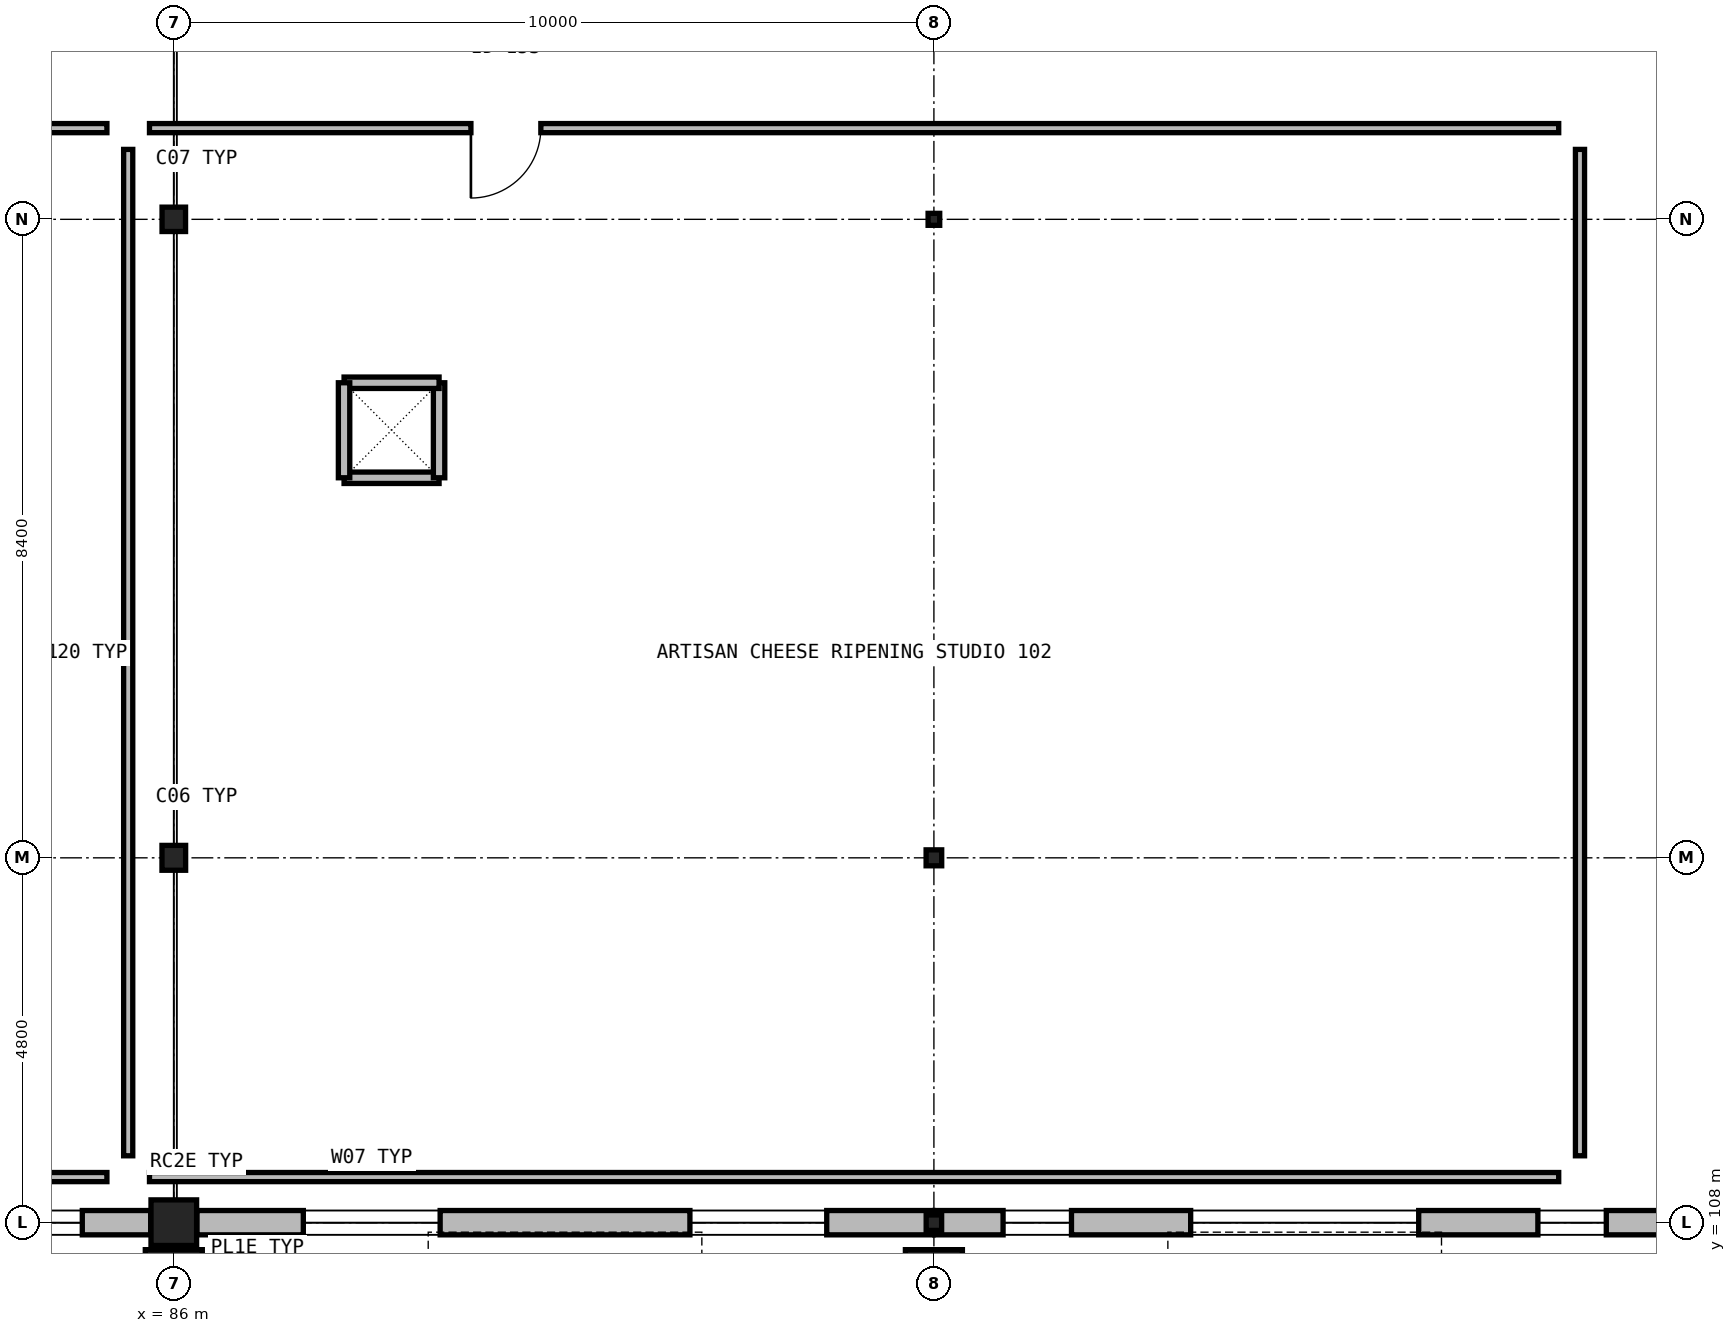
"""IFC4 building model, lengths in metres.
Left out: names, types, materials, properties, quantities, classifications, styles, units other than length and angle.
Written with IfcOpenShell. Run it as: python <this file> out.ifc"""

import sys

from ifc_helpers import new_model, si_unit, direction, frame, frame_2d, origin, origin_2d_with_axis, place, context, subcontext, project, spatial, rectangle, i_section, extrude, element, fill, save


model = new_model("IFC4")
c1 = context("Model", 3, precision=1e-05, world=origin(), true_north=direction((0.0, 1.0)))
c2 = subcontext(c1, "Body", "Model", "MODEL_VIEW")
j1 = project(units=[si_unit("LENGTHUNIT", "METRE"), si_unit("PLANEANGLEUNIT", "RADIAN")], contexts=[c1])
p1 = place(None, origin())
s1 = spatial("IfcSite", under=j1, at=p1, CompositionType="ELEMENT")
p2 = place(p1, origin())
s2 = spatial("IfcBuilding", under=s1, at=p2, CompositionType="ELEMENT")
p3 = place(p2, frame((0.0, 0.0, 4.5)))
s3 = spatial("IfcBuildingStorey", under=s2, at=p3, CompositionType="ELEMENT", Elevation=4.5)
for number, where, z_axis, x_axis in (
    (1, (86.0, 107.42, 0.0), (0.0, 0.0, 1.0), (1.0, 0.0, 0.0)),
    (2, (96.0, 107.42, 0.0), (0.0, 0.0, 1.0), (1.0, 0.0, 0.0)),
):
    element("IfcColumn", number, at=place(p3, frame(where, z_axis=z_axis, x_axis=x_axis)), inside=s3, PredefinedType="PILASTER", context=c2, shape_type="SweptSolid", body=[
        extrude(rectangle(XDim=0.75, YDim=0.45, at=origin_2d_with_axis()), origin(), (0.0, 0.0, 1.0), 3.9),
    ])
p4 = place(p3, frame((86.0, 108.0, 0.0), z_axis=(0.0, 0.0, 1.0), x_axis=(1.0, 0.0, 0.0)))
e3 = element("IfcColumn", 3, at=p4, inside=s3, PredefinedType="COLUMN", context=c2, shape_type="SweptSolid", body=[
    extrude(rectangle(XDim=0.6, YDim=0.6, at=origin_2d_with_axis()), origin(), (0.0, 0.0, 1.0), 3.9),
])
p5 = place(p3, frame((86.0, 112.8, 0.0), z_axis=(0.0, 0.0, 1.0), x_axis=(1.0, 0.0, 0.0)))
e4 = element("IfcColumn", 4, at=p5, inside=s3, PredefinedType="COLUMN", context=c2, shape_type="SweptSolid", body=[
    extrude(i_section(OverallWidth=0.311, OverallDepth=0.327, WebThickness=0.016, FlangeThickness=0.025, FilletRadius=0.017, at=origin_2d_with_axis()), origin(), (0.0, 0.0, 1.0), 3.9),
])
p6 = place(p3, frame((86.0, 121.2, 0.0), z_axis=(0.0, 0.0, 1.0), x_axis=(1.0, 0.0, 0.0)))
e5 = element("IfcColumn", 5, at=p6, inside=s3, PredefinedType="COLUMN", context=c2, shape_type="SweptSolid", body=[
    extrude(i_section(OverallWidth=0.309, OverallDepth=0.321, WebThickness=0.014, FlangeThickness=0.022, FilletRadius=0.017, at=origin_2d_with_axis()), origin(), (0.0, 0.0, 1.0), 3.9),
])
p7 = place(p3, frame((96.0, 108.0, 0.0), z_axis=(0.0, 0.0, 1.0), x_axis=(1.0, 0.0, 0.0)))
e6 = element("IfcColumn", 6, at=p7, inside=s3, PredefinedType="COLUMN", context=c2, shape_type="SweptSolid", body=[
    extrude(i_section(OverallWidth=0.203, OverallDepth=0.203, WebThickness=0.007, FlangeThickness=0.011, FilletRadius=0.011, at=origin_2d_with_axis()), origin(), (0.0, 0.0, 1.0), 3.9),
])
p8 = place(p3, frame((96.0, 112.8, 0.0), z_axis=(0.0, 0.0, 1.0), x_axis=(1.0, 0.0, 0.0)))
e7 = element("IfcColumn", 7, at=p8, inside=s3, PredefinedType="COLUMN", context=c2, shape_type="SweptSolid", body=[
    extrude(i_section(OverallWidth=0.205, OverallDepth=0.21, WebThickness=0.009, FlangeThickness=0.014, FilletRadius=0.011, at=origin_2d_with_axis()), origin(), (0.0, 0.0, 1.0), 3.9),
])
p9 = place(p3, frame((96.0, 121.2, 0.0), z_axis=(0.0, 0.0, 1.0), x_axis=(1.0, 0.0, 0.0)))
e8 = element("IfcColumn", 8, at=p9, inside=s3, PredefinedType="COLUMN", context=c2, shape_type="SweptSolid", body=[
    extrude(i_section(OverallWidth=0.153, OverallDepth=0.158, WebThickness=0.007, FlangeThickness=0.01, FilletRadius=0.009, at=origin_2d_with_axis()), origin(), (0.0, 0.0, 1.0), 3.9),
])
p10 = place(p3, frame((76.01, 108.0, 0.0), z_axis=(0.0, 0.0, 1.0), x_axis=(1.0, 0.0, 0.0)))
e9 = element("IfcWall", 9, at=p10, inside=s3, PredefinedType="SOLIDWALL", context=c2, shape_type="SweptSolid", body=[
    extrude(rectangle(XDim=9.686, YDim=0.32, at=frame_2d((4.843, 0.0), x_axis=(1.0, 0.0))), origin(), (0.0, 0.0, 1.0), 3.29),
])
p11 = place(p10, frame((3.343, 0.0, 0.85)))
e10 = element("IfcOpeningElement", 10, at=p11, cuts=e9, PredefinedType="OPENING", context=c2, shape_type="SweptSolid", body=[
    extrude(rectangle(XDim=3.0, YDim=1.9, at=frame_2d((1.5, 0.95), x_axis=(1.0, 0.0))), frame((0.0, 0.17, 0.0), z_axis=(0.0, -1.0, 0.0), x_axis=(1.0, 0.0, 0.0)), (0.0, 0.0, 1.0), 0.34),
])
p12 = place(p10, frame((0.9, 0.0, 0.85)))
e11 = element("IfcOpeningElement", 11, at=p12, cuts=e9, PredefinedType="OPENING", context=c2, shape_type="SweptSolid", body=[
    extrude(rectangle(XDim=0.9, YDim=1.9, at=frame_2d((0.45, 0.95), x_axis=(1.0, 0.0))), frame((0.0, 0.17, 0.0), z_axis=(0.0, -1.0, 0.0), x_axis=(1.0, 0.0, 0.0)), (0.0, 0.0, 1.0), 0.34),
])
p13 = place(p10, frame((7.886, 0.0, 0.85)))
e12 = element("IfcOpeningElement", 12, at=p13, cuts=e9, PredefinedType="OPENING", context=c2, shape_type="SweptSolid", body=[
    extrude(rectangle(XDim=0.9, YDim=1.9, at=frame_2d((0.45, 0.95), x_axis=(1.0, 0.0))), frame((0.0, 0.17, 0.0), z_axis=(0.0, -1.0, 0.0), x_axis=(1.0, 0.0, 0.0)), (0.0, 0.0, 1.0), 0.34),
])
p14 = place(p3, frame((86.304, 108.0, 0.0), z_axis=(0.0, 0.0, 1.0), x_axis=(1.0, 0.0, 0.0)))
e13 = element("IfcWall", 13, at=p14, inside=s3, PredefinedType="SOLIDWALL", context=c2, shape_type="SweptSolid", body=[
    extrude(rectangle(XDim=9.686, YDim=0.32, at=frame_2d((4.843, 0.0), x_axis=(1.0, 0.0))), origin(), (0.0, 0.0, 1.0), 3.29),
])
p15 = place(p14, frame((1.4, 0.0, 0.85)))
e14 = element("IfcOpeningElement", 14, at=p15, cuts=e13, PredefinedType="OPENING", context=c2, shape_type="SweptSolid", body=[
    extrude(rectangle(XDim=1.8, YDim=1.9, at=frame_2d((0.9, 0.95), x_axis=(1.0, 0.0))), frame((0.0, 0.17, 0.0), z_axis=(0.0, -1.0, 0.0), x_axis=(1.0, 0.0, 0.0)), (0.0, 0.0, 1.0), 0.34),
])
p16 = place(p14, frame((6.486, 0.0, 0.85)))
e15 = element("IfcOpeningElement", 15, at=p16, cuts=e13, PredefinedType="OPENING", context=c2, shape_type="SweptSolid", body=[
    extrude(rectangle(XDim=1.8, YDim=1.9, at=frame_2d((0.9, 0.95), x_axis=(1.0, 0.0))), frame((0.0, 0.17, 0.0), z_axis=(0.0, -1.0, 0.0), x_axis=(1.0, 0.0, 0.0)), (0.0, 0.0, 1.0), 0.34),
])
p17 = place(p3, frame((96.01, 108.0, 0.0), z_axis=(0.0, 0.0, 1.0), x_axis=(1.0, 0.0, 0.0)))
e16 = element("IfcWall", 16, at=p17, inside=s3, PredefinedType="SOLIDWALL", context=c2, shape_type="SweptSolid", body=[
    extrude(rectangle(XDim=9.736, YDim=0.32, at=frame_2d((4.868, 0.0), x_axis=(1.0, 0.0))), origin(), (0.0, 0.0, 1.0), 3.29),
])
p18 = place(p17, frame((3.368, 0.0, 0.85)))
e17 = element("IfcOpeningElement", 17, at=p18, cuts=e16, PredefinedType="OPENING", context=c2, shape_type="SweptSolid", body=[
    extrude(rectangle(XDim=3.0, YDim=1.9, at=frame_2d((1.5, 0.95), x_axis=(1.0, 0.0))), frame((0.0, 0.17, 0.0), z_axis=(0.0, -1.0, 0.0), x_axis=(1.0, 0.0, 0.0)), (0.0, 0.0, 1.0), 0.34),
])
p19 = place(p17, frame((0.9, 0.0, 0.85)))
e18 = element("IfcOpeningElement", 18, at=p19, cuts=e16, PredefinedType="OPENING", context=c2, shape_type="SweptSolid", body=[
    extrude(rectangle(XDim=0.9, YDim=1.9, at=frame_2d((0.45, 0.95), x_axis=(1.0, 0.0))), frame((0.0, 0.17, 0.0), z_axis=(0.0, -1.0, 0.0), x_axis=(1.0, 0.0, 0.0)), (0.0, 0.0, 1.0), 0.34),
])
p20 = place(p17, frame((7.936, 0.0, 0.85)))
e19 = element("IfcOpeningElement", 19, at=p20, cuts=e16, PredefinedType="OPENING", context=c2, shape_type="SweptSolid", body=[
    extrude(rectangle(XDim=0.9, YDim=1.9, at=frame_2d((0.45, 0.95), x_axis=(1.0, 0.0))), frame((0.0, 0.17, 0.0), z_axis=(0.0, -1.0, 0.0), x_axis=(1.0, 0.0, 0.0)), (0.0, 0.0, 1.0), 0.34),
])
for number, where, z_axis, x_axis in (
    (20, (88.24, 117.8, 0.0), (0.0, 0.0, 1.0), (1.0, 0.0, 0.0)),
    (21, (89.49, 117.8, 0.0), (0.0, 0.0, 1.0), (0.0, 1.0, 0.0)),
    (22, (89.49, 119.05, 0.0), (0.0, 0.0, 1.0), (-1.0, 0.0, 0.0)),
    (23, (88.24, 119.05, 0.0), (0.0, 0.0, 1.0), (0.0, -1.0, 0.0)),
):
    element("IfcWall", number, at=place(p3, frame(where, z_axis=z_axis, x_axis=x_axis)), inside=s3, PredefinedType="PARTITIONING", context=c2, shape_type="SweptSolid", body=[
        extrude(rectangle(XDim=1.25, YDim=0.15, at=frame_2d((0.625, 0.0), x_axis=(1.0, 0.0))), origin(), (0.0, 0.0, 1.0), 3.17),
    ])
p21 = place(p3, frame((67.08, 108.6, 0.0), z_axis=(0.0, 0.0, 1.0), x_axis=(1.0, 0.0, 0.0)))
e24 = element("IfcWall", 24, at=p21, inside=s3, PredefinedType="PARTITIONING", context=c2, shape_type="SweptSolid", body=[
    extrude(rectangle(XDim=18.04, YDim=0.12, at=frame_2d((9.02, 0.0), x_axis=(1.0, 0.0))), origin(), (0.0, 0.0, 1.0), 3.03),
])
p22 = place(p3, frame((85.4, 108.88, 0.0), z_axis=(0.0, 0.0, 1.0), x_axis=(0.0, 1.0, 0.0)))
e25 = element("IfcWall", 25, at=p22, inside=s3, PredefinedType="PARTITIONING", context=c2, shape_type="SweptSolid", body=[
    extrude(rectangle(XDim=13.24, YDim=0.12, at=frame_2d((6.62, 0.0), x_axis=(1.0, 0.0))), origin(), (0.0, 0.0, 1.0), 3.03),
])
p23 = place(p3, frame((85.12, 122.4, 0.0), z_axis=(0.0, 0.0, 1.0), x_axis=(-1.0, 0.0, 0.0)))
e26 = element("IfcWall", 26, at=p23, inside=s3, PredefinedType="PARTITIONING", context=c2, shape_type="SweptSolid", body=[
    extrude(rectangle(XDim=18.04, YDim=0.12, at=frame_2d((9.02, 0.0), x_axis=(1.0, 0.0))), origin(), (0.0, 0.0, 1.0), 3.03),
])
p24 = place(p23, frame((4.102, 0.0, 0.0)))
e27 = element("IfcOpeningElement", 27, at=p24, cuts=e26, PredefinedType="OPENING", context=c2, shape_type="SweptSolid", body=[
    extrude(rectangle(XDim=0.95, YDim=2.15, at=frame_2d((0.475, 1.075), x_axis=(1.0, 0.0))), frame((0.0, 0.07, 0.0), z_axis=(0.0, -1.0, 0.0), x_axis=(1.0, 0.0, 0.0)), (0.0, 0.0, 1.0), 0.14),
])
p25 = place(p3, frame((85.68, 108.6, 0.0), z_axis=(0.0, 0.0, 1.0), x_axis=(1.0, 0.0, 0.0)))
e28 = element("IfcWall", 28, at=p25, inside=s3, PredefinedType="PARTITIONING", context=c2, shape_type="SweptSolid", body=[
    extrude(rectangle(XDim=18.54, YDim=0.12, at=frame_2d((9.27, 0.0), x_axis=(1.0, 0.0))), origin(), (0.0, 0.0, 1.0), 3.03),
])
p26 = place(p3, frame((104.5, 108.88, 0.0), z_axis=(0.0, 0.0, 1.0), x_axis=(0.0, 1.0, 0.0)))
e29 = element("IfcWall", 29, at=p26, inside=s3, PredefinedType="PARTITIONING", context=c2, shape_type="SweptSolid", body=[
    extrude(rectangle(XDim=13.24, YDim=0.12, at=frame_2d((6.62, 0.0), x_axis=(1.0, 0.0))), origin(), (0.0, 0.0, 1.0), 3.03),
])
p27 = place(p3, frame((104.22, 122.4, 0.0), z_axis=(0.0, 0.0, 1.0), x_axis=(-1.0, 0.0, 0.0)))
e30 = element("IfcWall", 30, at=p27, inside=s3, PredefinedType="PARTITIONING", context=c2, shape_type="SweptSolid", body=[
    extrude(rectangle(XDim=18.54, YDim=0.12, at=frame_2d((9.27, 0.0), x_axis=(1.0, 0.0))), origin(), (0.0, 0.0, 1.0), 3.03),
])
p28 = place(p27, frame((13.391, 0.0, 0.0)))
e31 = element("IfcOpeningElement", 31, at=p28, cuts=e30, PredefinedType="OPENING", context=c2, shape_type="SweptSolid", body=[
    extrude(rectangle(XDim=0.92, YDim=2.15, at=frame_2d((0.46, 1.075), x_axis=(1.0, 0.0))), frame((0.0, 0.07, 0.0), z_axis=(0.0, -1.0, 0.0), x_axis=(1.0, 0.0, 0.0)), (0.0, 0.0, 1.0), 0.14),
])
p29 = place(p13, origin())
e32 = element("IfcWindow", 32, at=p29, inside=s3, PartitioningType="SINGLE_PANEL", PredefinedType="WINDOW", context=c2, shape_type="SweptSolid", body=[
    extrude(rectangle(XDim=0.9, YDim=1.9, at=frame_2d((0.45, 0.95), x_axis=(1.0, 0.0))), frame((0.0, 0.03, 0.0), z_axis=(0.0, -1.0, 0.0), x_axis=(1.0, 0.0, 0.0)), (0.0, 0.0, 1.0), 0.06),
])
fill(e12, e32)
p30 = place(p15, origin())
e33 = element("IfcWindow", 33, at=p30, inside=s3, PartitioningType="SINGLE_PANEL", PredefinedType="WINDOW", context=c2, shape_type="SweptSolid", body=[
    extrude(rectangle(XDim=1.8, YDim=1.9, at=frame_2d((0.9, 0.95), x_axis=(1.0, 0.0))), frame((0.0, 0.03, 0.0), z_axis=(0.0, -1.0, 0.0), x_axis=(1.0, 0.0, 0.0)), (0.0, 0.0, 1.0), 0.06),
])
fill(e14, e33)
p31 = place(p16, origin())
e34 = element("IfcWindow", 34, at=p31, inside=s3, PartitioningType="SINGLE_PANEL", PredefinedType="WINDOW", context=c2, shape_type="SweptSolid", body=[
    extrude(rectangle(XDim=1.8, YDim=1.9, at=frame_2d((0.9, 0.95), x_axis=(1.0, 0.0))), frame((0.0, 0.03, 0.0), z_axis=(0.0, -1.0, 0.0), x_axis=(1.0, 0.0, 0.0)), (0.0, 0.0, 1.0), 0.06),
])
fill(e15, e34)
p32 = place(p18, origin())
e35 = element("IfcWindow", 35, at=p32, inside=s3, PartitioningType="SINGLE_PANEL", PredefinedType="WINDOW", context=c2, shape_type="SweptSolid", body=[
    extrude(rectangle(XDim=3.0, YDim=1.9, at=frame_2d((1.5, 0.95), x_axis=(1.0, 0.0))), frame((0.0, 0.03, 0.0), z_axis=(0.0, -1.0, 0.0), x_axis=(1.0, 0.0, 0.0)), (0.0, 0.0, 1.0), 0.06),
])
fill(e17, e35)
p33 = place(p19, origin())
e36 = element("IfcWindow", 36, at=p33, inside=s3, PartitioningType="SINGLE_PANEL", PredefinedType="WINDOW", context=c2, shape_type="SweptSolid", body=[
    extrude(rectangle(XDim=0.9, YDim=1.9, at=frame_2d((0.45, 0.95), x_axis=(1.0, 0.0))), frame((0.0, 0.03, 0.0), z_axis=(0.0, -1.0, 0.0), x_axis=(1.0, 0.0, 0.0)), (0.0, 0.0, 1.0), 0.06),
])
fill(e18, e36)
p34 = place(p20, origin())
e37 = element("IfcWindow", 37, at=p34, inside=s3, PartitioningType="SINGLE_PANEL", PredefinedType="WINDOW", context=c2, shape_type="SweptSolid", body=[
    extrude(rectangle(XDim=0.9, YDim=1.9, at=frame_2d((0.45, 0.95), x_axis=(1.0, 0.0))), frame((0.0, 0.03, 0.0), z_axis=(0.0, -1.0, 0.0), x_axis=(1.0, 0.0, 0.0)), (0.0, 0.0, 1.0), 0.06),
])
fill(e19, e37)
p35 = place(p28, origin())
e38 = element("IfcDoor", 38, at=p35, inside=s3, OperationType="SINGLE_SWING_RIGHT", PredefinedType="DOOR", context=c2, shape_type="SweptSolid", body=[
    extrude(rectangle(XDim=0.92, YDim=2.15, at=frame_2d((0.46, 1.075), x_axis=(1.0, 0.0))), frame((0.0, 0.025, 0.0), z_axis=(0.0, -1.0, 0.0), x_axis=(1.0, 0.0, 0.0)), (0.0, 0.0, 1.0), 0.05),
])
fill(e31, e38)
save(model, sys.argv[1])
